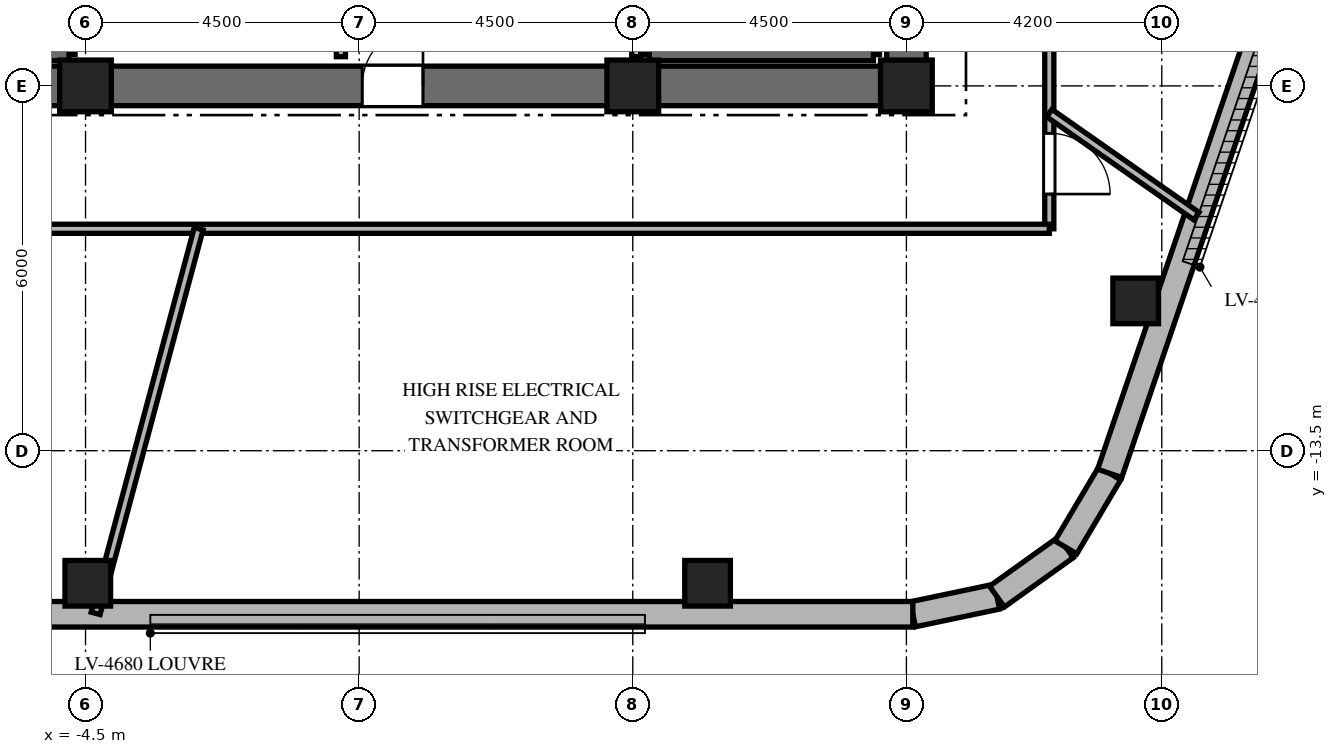
"""IFC4 building model, lengths in metres.
Left out: names, types, materials, properties, quantities, classifications, styles, units other than length and angle.
Written with IfcOpenShell. Run it as: python <this file> out.ifc"""

import sys

from ifc_helpers import new_model, si_unit, direction, frame, frame_2d, origin, origin_2d, place, context, subcontext, project, spatial, rectangle, extrude, element, fill, save


model = new_model("IFC4")
c1 = context("Model", 3, precision=1e-05, world=origin(), true_north=direction((0.0, 1.0)))
c2 = subcontext(c1, "Body", "Model", "MODEL_VIEW")
j1 = project(units=[si_unit("LENGTHUNIT", "METRE"), si_unit("PLANEANGLEUNIT", "RADIAN")], contexts=[c1])
p1 = place(None, origin())
s1 = spatial("IfcSite", under=j1, at=p1, CompositionType="ELEMENT")
p2 = place(p1, origin())
s2 = spatial("IfcBuilding", under=s1, at=p2, CompositionType="ELEMENT")
p3 = place(p2, frame((0.0, 0.0, 310.4)))
s3 = spatial("IfcBuildingStorey", under=s2, at=p3, CompositionType="ELEMENT", Elevation=310.4)
p4 = place(p3, frame((-9.325, -7.5, 0.0), z_axis=(0.0, 0.0, 1.0), x_axis=(1.0, 0.0, 0.0)))
e1 = element("IfcWall", 1, at=p4, inside=s3, PredefinedType="SHEAR", context=c2, shape_type="SweptSolid", body=[
    extrude(rectangle(XDim=18.65, YDim=0.65, at=frame_2d((9.325, 0.0))), origin(), (0.0, 0.0, 1.0), 5.5),
])
p5 = place(p4, frame((9.375, 0.0, 0.0)))
e2 = element("IfcOpeningElement", 2, at=p5, cuts=e1, PredefinedType="OPENING", context=c2, shape_type="SweptSolid", body=[
    extrude(rectangle(XDim=1.0, YDim=2.15, at=frame_2d((0.5, 1.075))), frame((0.0, 0.335, 0.0), z_axis=(0.0, -1.0, 0.0), x_axis=(1.0, 0.0, 0.0)), (0.0, 0.0, 1.0), 0.67),
])
p6 = place(p3, frame((9.0, -7.175, 0.0), z_axis=(0.0, 0.0, 1.0), x_axis=(0.0, 1.0, 0.0)))
e3 = element("IfcWall", 3, at=p6, inside=s3, PredefinedType="SHEAR", context=c2, shape_type="SweptSolid", body=[
    extrude(rectangle(XDim=14.35, YDim=0.65, at=frame_2d((7.175, 0.0))), origin(), (0.0, 0.0, 1.0), 5.5),
])
p7 = place(p6, frame((10.3, 0.0, 0.0)))
e4 = element("IfcOpeningElement", 4, at=p7, cuts=e3, PredefinedType="OPENING", context=c2, shape_type="SweptSolid", body=[
    extrude(rectangle(XDim=1.05, YDim=2.15, at=frame_2d((0.525, 1.075))), frame((0.0, 0.335, 0.0), z_axis=(0.0, -1.0, 0.0), x_axis=(1.0, 0.0, 0.0)), (0.0, 0.0, 1.0), 0.67),
])
p8 = place(p3, frame((-4.772, -6.985, 0.0), z_axis=(0.0, 0.0, 1.0), x_axis=(0.0, 1.0, 0.0)))
e5 = element("IfcWall", 5, at=p8, inside=s3, PredefinedType="SHEAR", context=c2, shape_type="SweptSolid", body=[
    extrude(rectangle(XDim=9.143, YDim=0.2, at=frame_2d((4.572, 0.0))), origin(), (0.0, 0.0, 1.0), 5.5),
])
p9 = place(p3, frame((-8.458, -6.985, 0.0), z_axis=(0.0, 0.0, 1.0), x_axis=(1.0, 0.0, 0.0)))
e6 = element("IfcWall", 6, at=p9, inside=s3, PredefinedType="SHEAR", context=c2, shape_type="SweptSolid", body=[
    extrude(rectangle(XDim=3.686, YDim=0.2, at=frame_2d((1.843, 0.0))), origin(), (0.0, 0.0, 1.0), 5.5),
])
for number, where, z_axis, x_axis in (
    (7, (4.772, -6.985, 0.0), (0.0, 0.0, 1.0), (0.0, 1.0, 0.0)),
    (8, (8.458, -6.985, 0.0), (0.0, 0.0, 1.0), (0.0, 1.0, 0.0)),
):
    element("IfcWall", number, at=place(p3, frame(where, z_axis=z_axis, x_axis=x_axis)), inside=s3, PredefinedType="SHEAR", context=c2, shape_type="SweptSolid", body=[
        extrude(rectangle(XDim=9.143, YDim=0.2, at=frame_2d((4.572, 0.0))), origin(), (0.0, 0.0, 1.0), 5.5),
    ])
p10 = place(p3, frame((4.772, -6.985, 0.0), z_axis=(0.0, 0.0, 1.0), x_axis=(1.0, 0.0, 0.0)))
e9 = element("IfcWall", 9, at=p10, inside=s3, PredefinedType="SHEAR", context=c2, shape_type="SweptSolid", body=[
    extrude(rectangle(XDim=3.686, YDim=0.2, at=frame_2d((1.843, 0.0))), origin(), (0.0, 0.0, 1.0), 5.5),
])
for number, where, z_axis, x_axis in (
    (10, (-4.5, -7.5, 0.0), (0.0, 0.0, 1.0), (1.0, 0.0, 0.0)),
    (11, (4.5, -7.5, 0.0), (0.0, 0.0, 1.0), (1.0, 0.0, 0.0)),
    (12, (9.0, -7.5, 0.0), (0.0, 0.0, 1.0), (1.0, 0.0, 0.0)),
):
    element("IfcColumn", number, at=place(p3, frame(where, z_axis=z_axis, x_axis=x_axis)), inside=s3, PredefinedType="COLUMN", context=c2, shape_type="SweptSolid", body=[
        extrude(rectangle(XDim=0.85, YDim=0.85, at=origin_2d()), origin(), (0.0, 0.0, 1.0), 5.5),
    ])
for number, where, z_axis, x_axis in (
    (13, (-4.463, -15.68, 0.0), (0.0, 0.0, 1.0), (1.0, 0.0, 0.0)),
    (14, (5.73, -15.68, 0.0), (0.0, 0.0, 1.0), (1.0, 0.0, 0.0)),
    (15, (12.771, -11.036, 0.0), (0.0, 0.0, 1.0), (1.0, 0.0, 0.0)),
):
    element("IfcColumn", number, at=place(p3, frame(where, z_axis=z_axis, x_axis=x_axis)), inside=s3, PredefinedType="COLUMN", context=c2, shape_type="SweptSolid", body=[
        extrude(rectangle(XDim=0.75, YDim=0.75, at=origin_2d()), origin(), (0.0, 0.0, 1.0), 5.5),
    ])
p11 = place(p3, frame((9.106, -16.19, 0.0), z_axis=(0.0, 0.0, 1.0), x_axis=(0.978670507127, 0.205436215114, 0.0)))
e16 = element("IfcWall", 16, at=p11, inside=s3, PredefinedType="SOLIDWALL", context=c2, shape_type="SweptSolid", body=[
    extrude(rectangle(XDim=1.414, YDim=0.42, at=frame_2d((0.707, 0.0))), origin(), (0.0, 0.0, 1.0), 5.18),
])
p12 = place(p3, frame((10.49, -15.899, 0.0), z_axis=(0.0, 0.0, 1.0), x_axis=(0.813104912719, 0.58211717112, 0.0)))
e17 = element("IfcWall", 17, at=p12, inside=s3, PredefinedType="SOLIDWALL", context=c2, shape_type="SweptSolid", body=[
    extrude(rectangle(XDim=1.392, YDim=0.42, at=frame_2d((0.696, 0.0))), origin(), (0.0, 0.0, 1.0), 5.18),
])
p13 = place(p3, frame((11.622, -15.089, 0.0), z_axis=(0.0, 0.0, 1.0), x_axis=(0.510403153597, 0.859935242212, 0.0)))
e18 = element("IfcWall", 18, at=p13, inside=s3, PredefinedType="SOLIDWALL", context=c2, shape_type="SweptSolid", body=[
    extrude(rectangle(XDim=1.414, YDim=0.42, at=frame_2d((0.707, 0.0))), origin(), (0.0, 0.0, 1.0), 5.18),
])
p14 = place(p3, frame((-7.84, -16.19, 0.0), z_axis=(0.0, 0.0, 1.0), x_axis=(1.0, 0.0, 0.0)))
e19 = element("IfcWall", 19, at=p14, inside=s3, PredefinedType="SOLIDWALL", context=c2, shape_type="SweptSolid", body=[
    extrude(rectangle(XDim=16.946, YDim=0.42, at=frame_2d((8.473, 0.0))), origin(), (0.0, 0.0, 1.0), 5.18),
])
p15 = place(p3, frame((12.344, -13.873, 0.0), z_axis=(0.0, 0.0, 1.0), x_axis=(0.322553427155, 0.946551259378, 0.0)))
e20 = element("IfcWall", 20, at=p15, inside=s3, PredefinedType="SOLIDWALL", context=c2, shape_type="SweptSolid", body=[
    extrude(rectangle(XDim=14.191, YDim=0.42, at=frame_2d((7.096, 0.0))), origin(), (0.0, 0.0, 1.0), 5.18),
])
for number, where, z_axis, x_axis in (
    (21, (-0.3, -7.02, 0.0), (0.0, 0.0, 1.0), (0.0, 1.0, 0.0)),
    (22, (4.558, -7.02, 0.0), (0.0, 0.0, 1.0), (0.0, 1.0, 0.0)),
):
    element("IfcWall", number, at=place(p3, frame(where, z_axis=z_axis, x_axis=x_axis)), inside=s3, PredefinedType="PARTITIONING", context=c2, shape_type="SweptSolid", body=[
        extrude(rectangle(XDim=1.362, YDim=0.15, at=frame_2d((0.681, 0.0))), origin(), (0.0, 0.0, 1.0), 5.18),
    ])
p16 = place(p3, frame((11.35, 9.85, 0.0), z_axis=(0.0, 0.0, 1.0), x_axis=(0.0, -1.0, 0.0)))
e23 = element("IfcWall", 23, at=p16, inside=s3, PredefinedType="PARTITIONING", context=c2, shape_type="SweptSolid", body=[
    extrude(rectangle(XDim=19.7, YDim=0.15, at=frame_2d((9.85, 0.0))), origin(), (0.0, 0.0, 1.0), 4.67),
])
p17 = place(p16, frame((18.129, 0.0, 0.0)))
e24 = element("IfcOpeningElement", 24, at=p17, cuts=e23, PredefinedType="OPENING", context=c2, shape_type="SweptSolid", body=[
    extrude(rectangle(XDim=1.0, YDim=2.15, at=frame_2d((0.5, 1.075))), frame((0.0, 0.085, 0.0), z_axis=(0.0, -1.0, 0.0), x_axis=(1.0, 0.0, 0.0)), (0.0, 0.0, 1.0), 0.17),
])
p18 = place(p16, frame((8.545, 0.0, 0.0)))
e25 = element("IfcOpeningElement", 25, at=p18, cuts=e23, PredefinedType="OPENING", context=c2, shape_type="SweptSolid", body=[
    extrude(rectangle(XDim=1.0, YDim=2.15, at=frame_2d((0.5, 1.075))), frame((0.0, 0.085, 0.0), z_axis=(0.0, -1.0, 0.0), x_axis=(1.0, 0.0, 0.0)), (0.0, 0.0, 1.0), 0.17),
])
p19 = place(p3, frame((11.35, -9.85, 0.0), z_axis=(0.0, 0.0, 1.0), x_axis=(-1.0, 0.0, 0.0)))
e26 = element("IfcWall", 26, at=p19, inside=s3, PredefinedType="PARTITIONING", context=c2, shape_type="SweptSolid", body=[
    extrude(rectangle(XDim=22.7, YDim=0.15, at=frame_2d((11.35, 0.0))), origin(), (0.0, 0.0, 1.0), 4.67),
])
p20 = place(p3, frame((-2.639, -9.85, 0.0), z_axis=(0.0, 0.0, 1.0), x_axis=(-0.258792616312, -0.965932907475, 0.0)))
e27 = element("IfcWall", 27, at=p20, inside=s3, PredefinedType="PARTITIONING", context=c2, shape_type="SweptSolid", body=[
    extrude(rectangle(XDim=6.548, YDim=0.15, at=frame_2d((3.274, 0.0))), origin(), (0.0, 0.0, 1.0), 4.52),
])
p21 = place(p3, frame((11.35, -7.948, 0.0), z_axis=(0.0, 0.0, 1.0), x_axis=(0.819127049933, -0.573612130335, 0.0)))
e28 = element("IfcWall", 28, at=p21, inside=s3, PredefinedType="PARTITIONING", context=c2, shape_type="SweptSolid", body=[
    extrude(rectangle(XDim=2.953, YDim=0.15, at=frame_2d((1.477, 0.0))), origin(), (0.0, 0.0, 1.0), 4.52),
])
p22 = place(p5, origin())
e29 = element("IfcDoor", 29, at=p22, inside=s3, OperationType="SINGLE_SWING_RIGHT", PredefinedType="DOOR", context=c2, shape_type="SweptSolid", body=[
    extrude(rectangle(XDim=1.0, YDim=2.15, at=frame_2d((0.5, 1.075))), frame((0.0, 0.025, 0.0), z_axis=(0.0, -1.0, 0.0), x_axis=(1.0, 0.0, 0.0)), (0.0, 0.0, 1.0), 0.05),
])
fill(e2, e29)
p23 = place(p17, origin())
e30 = element("IfcDoor", 30, at=p23, inside=s3, OperationType="SINGLE_SWING_RIGHT", PredefinedType="DOOR", context=c2, shape_type="SweptSolid", body=[
    extrude(rectangle(XDim=1.0, YDim=2.15, at=frame_2d((0.5, 1.075))), frame((0.0, 0.025, 0.0), z_axis=(0.0, -1.0, 0.0), x_axis=(1.0, 0.0, 0.0)), (0.0, 0.0, 1.0), 0.05),
])
fill(e24, e30)
save(model, sys.argv[1])
